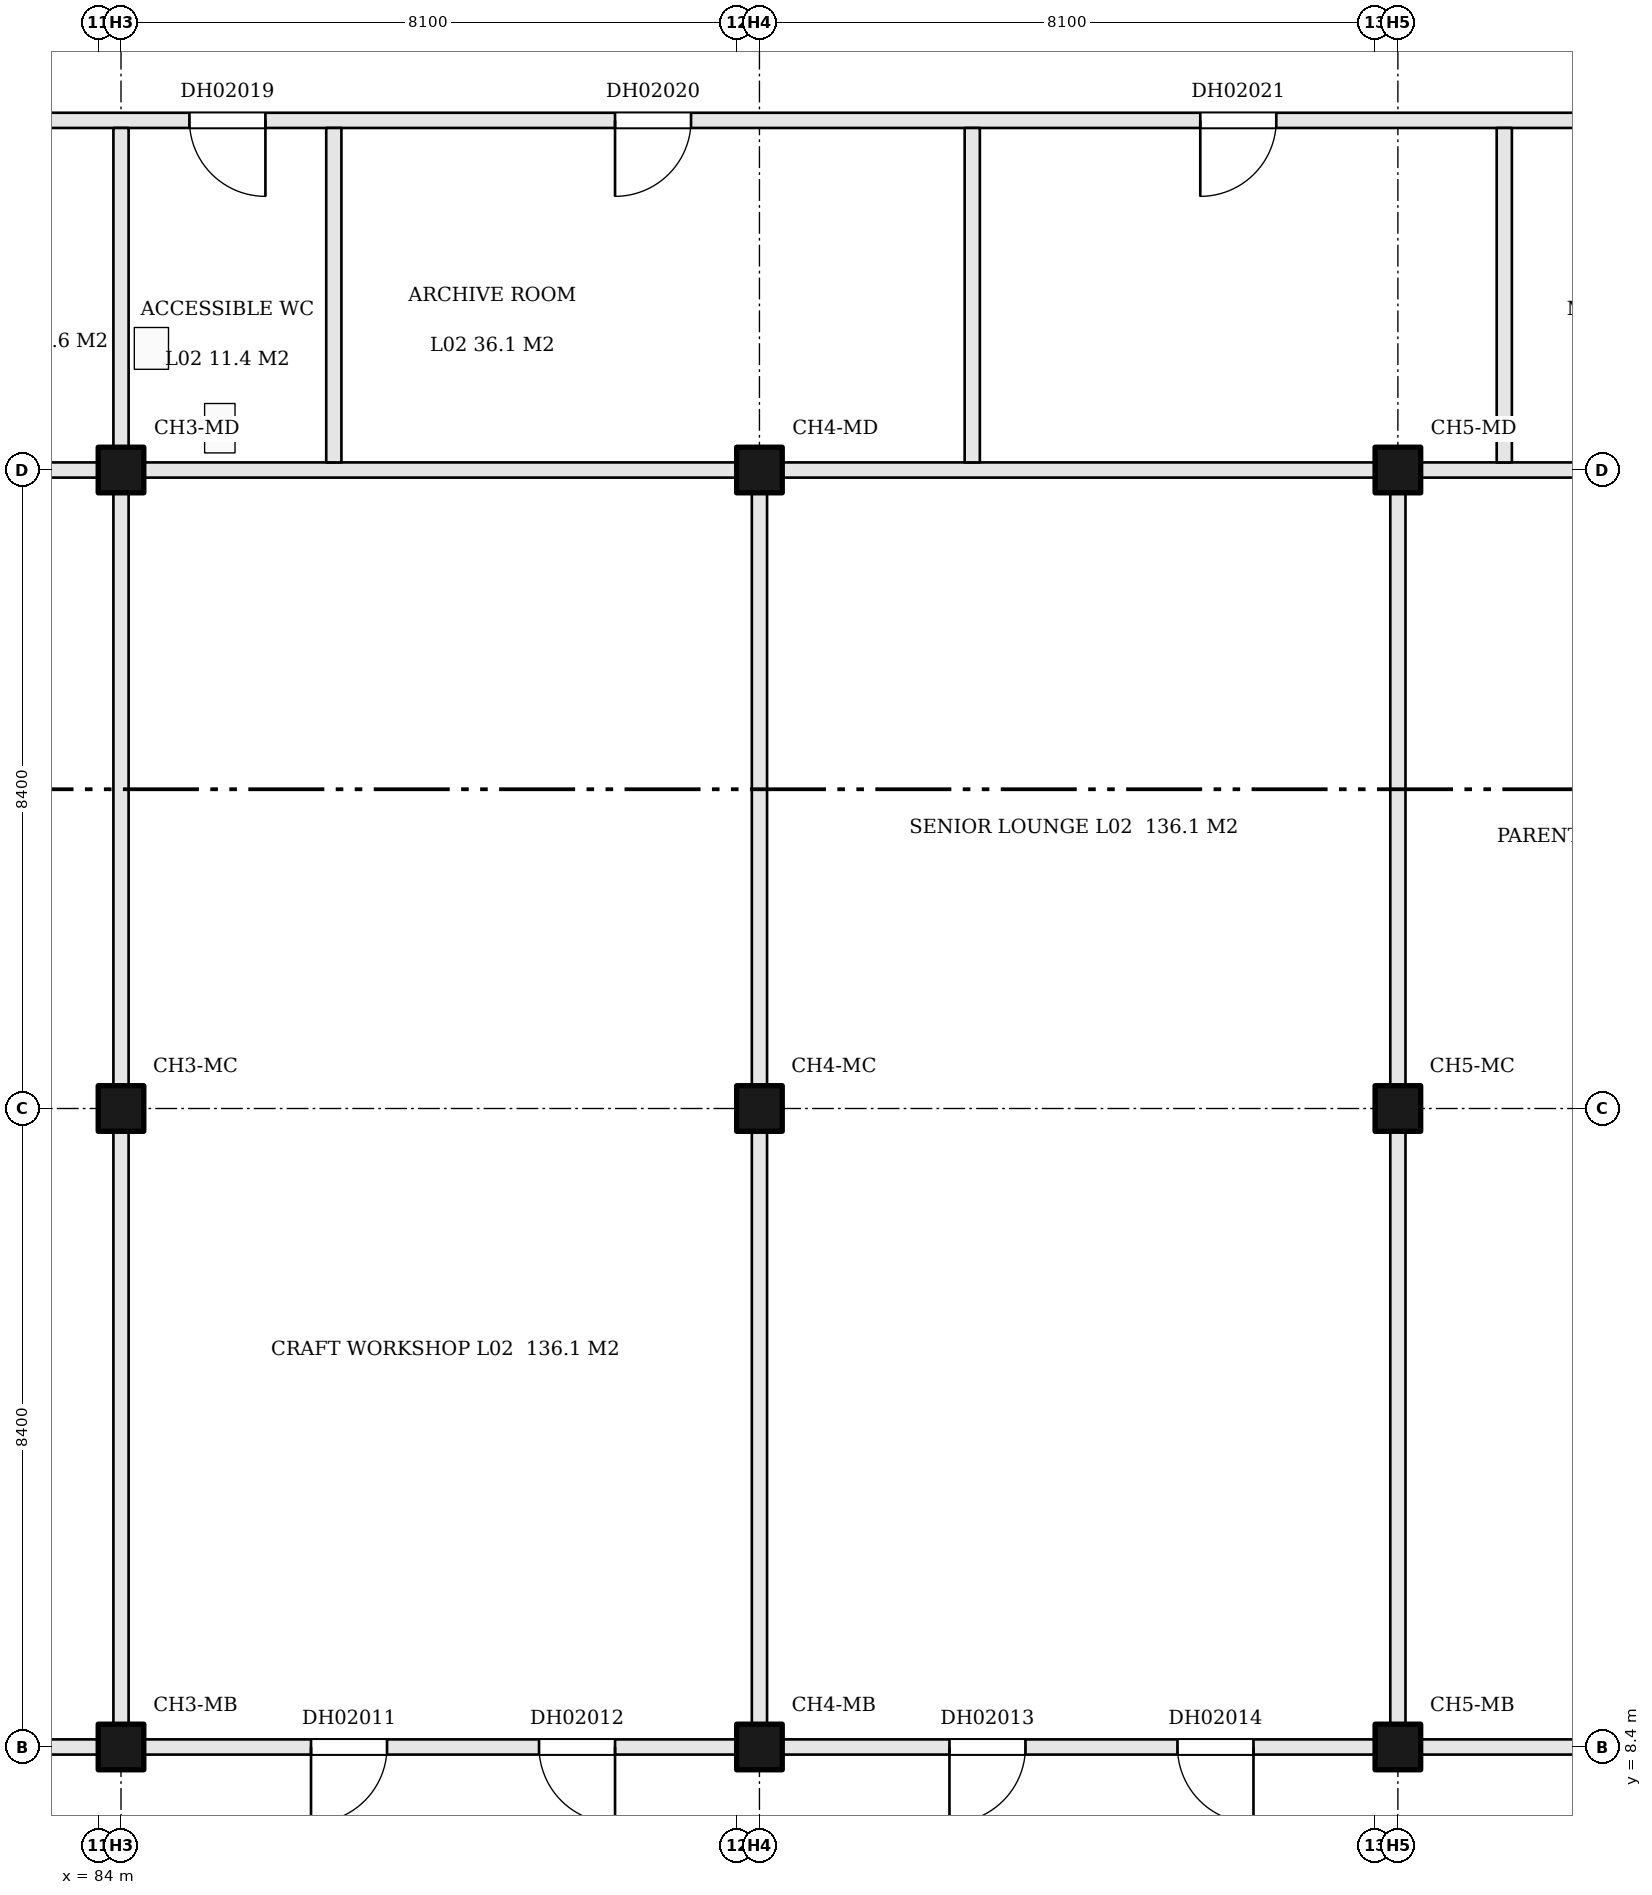
"""IFC4 building model, lengths in metres.
Left out: names, types, materials, properties, quantities, classifications, styles, units other than length and angle.
Written with IfcOpenShell. Run it as: python <this file> out.ifc"""

import sys

from ifc_helpers import new_model, si_unit, direction, frame, frame_2d, origin, origin_2d, place, context, subcontext, project, spatial, rectangle, extrude, element, fill, save


model = new_model("IFC4")
c1 = context("Model", 3, precision=1e-05, world=origin(), true_north=direction((0.0, 1.0)))
c2 = subcontext(c1, "Body", "Model", "MODEL_VIEW")
j1 = project(units=[si_unit("LENGTHUNIT", "METRE"), si_unit("PLANEANGLEUNIT", "RADIAN")], contexts=[c1])
p1 = place(None, origin())
s1 = spatial("IfcSite", under=j1, at=p1, CompositionType="ELEMENT")
p2 = place(p1, origin())
s2 = spatial("IfcBuilding", under=s1, at=p2, CompositionType="ELEMENT")
p3 = place(p2, frame((0.0, 0.0, 14.4)))
s3 = spatial("IfcBuildingStorey", under=s2, at=p3, CompositionType="ELEMENT", Elevation=14.4)
for number, where, z_axis, x_axis in (
    (1, (84.3, 8.4, 0.0), (0.0, 0.0, 1.0), (1.0, 0.0, 0.0)),
    (2, (84.3, 16.8, 0.0), (0.0, 0.0, 1.0), (1.0, 0.0, 0.0)),
    (3, (84.3, 25.2, 0.0), (0.0, 0.0, 1.0), (1.0, 0.0, 0.0)),
    (4, (92.7, 8.4, 0.0), (0.0, 0.0, 1.0), (1.0, 0.0, 0.0)),
    (5, (92.7, 16.8, 0.0), (0.0, 0.0, 1.0), (1.0, 0.0, 0.0)),
    (6, (92.7, 25.2, 0.0), (0.0, 0.0, 1.0), (1.0, 0.0, 0.0)),
    (7, (101.1, 8.4, 0.0), (0.0, 0.0, 1.0), (1.0, 0.0, 0.0)),
    (8, (101.1, 16.8, 0.0), (0.0, 0.0, 1.0), (1.0, 0.0, 0.0)),
    (9, (101.1, 25.2, 0.0), (0.0, 0.0, 1.0), (1.0, 0.0, 0.0)),
):
    element("IfcColumn", number, at=place(p3, frame(where, z_axis=z_axis, x_axis=x_axis)), inside=s3, PredefinedType="COLUMN", context=c2, shape_type="SweptSolid", body=[
        extrude(rectangle(XDim=0.6, YDim=0.6, at=origin_2d()), origin(), (0.0, 0.0, 1.0), 5.1),
    ])
p4 = place(p3, frame((76.2, 8.4, 0.0), z_axis=(0.0, 0.0, 1.0), x_axis=(1.0, 0.0, 0.0)))
e10 = element("IfcWall", 10, at=p4, inside=s3, PredefinedType="PARTITIONING", context=c2, shape_type="SweptSolid", body=[
    extrude(rectangle(XDim=7.8, YDim=0.2, at=frame_2d((3.9, 0.0))), origin(), (0.0, 0.0, 1.0), 5.1),
])
p5 = place(p4, frame((2.2, 0.0, 0.0)))
e11 = element("IfcOpeningElement", 11, at=p5, cuts=e10, PredefinedType="OPENING", context=c2, shape_type="SweptSolid", body=[
    extrude(rectangle(XDim=1.0, YDim=2.1, at=frame_2d((0.5, 1.05))), frame((0.0, 0.11, 0.0), z_axis=(0.0, -1.0, 0.0), x_axis=(1.0, 0.0, 0.0)), (0.0, 0.0, 1.0), 0.22),
])
p6 = place(p4, frame((5.2, 0.0, 0.0)))
e12 = element("IfcOpeningElement", 12, at=p6, cuts=e10, PredefinedType="OPENING", context=c2, shape_type="SweptSolid", body=[
    extrude(rectangle(XDim=1.0, YDim=2.1, at=frame_2d((0.5, 1.05))), frame((0.0, 0.11, 0.0), z_axis=(0.0, -1.0, 0.0), x_axis=(1.0, 0.0, 0.0)), (0.0, 0.0, 1.0), 0.22),
])
p7 = place(p3, frame((84.6, 8.4, 0.0), z_axis=(0.0, 0.0, 1.0), x_axis=(1.0, 0.0, 0.0)))
e13 = element("IfcWall", 13, at=p7, inside=s3, PredefinedType="PARTITIONING", context=c2, shape_type="SweptSolid", body=[
    extrude(rectangle(XDim=7.8, YDim=0.2, at=frame_2d((3.9, 0.0))), origin(), (0.0, 0.0, 1.0), 5.1),
])
p8 = place(p7, frame((2.2, 0.0, 0.0)))
e14 = element("IfcOpeningElement", 14, at=p8, cuts=e13, PredefinedType="OPENING", context=c2, shape_type="SweptSolid", body=[
    extrude(rectangle(XDim=1.0, YDim=2.1, at=frame_2d((0.5, 1.05))), frame((0.0, 0.11, 0.0), z_axis=(0.0, -1.0, 0.0), x_axis=(1.0, 0.0, 0.0)), (0.0, 0.0, 1.0), 0.22),
])
p9 = place(p7, frame((5.2, 0.0, 0.0)))
e15 = element("IfcOpeningElement", 15, at=p9, cuts=e13, PredefinedType="OPENING", context=c2, shape_type="SweptSolid", body=[
    extrude(rectangle(XDim=1.0, YDim=2.1, at=frame_2d((0.5, 1.05))), frame((0.0, 0.11, 0.0), z_axis=(0.0, -1.0, 0.0), x_axis=(1.0, 0.0, 0.0)), (0.0, 0.0, 1.0), 0.22),
])
p10 = place(p3, frame((93.0, 8.4, 0.0), z_axis=(0.0, 0.0, 1.0), x_axis=(1.0, 0.0, 0.0)))
e16 = element("IfcWall", 16, at=p10, inside=s3, PredefinedType="PARTITIONING", context=c2, shape_type="SweptSolid", body=[
    extrude(rectangle(XDim=7.8, YDim=0.2, at=frame_2d((3.9, 0.0))), origin(), (0.0, 0.0, 1.0), 5.1),
])
p11 = place(p10, frame((2.2, 0.0, 0.0)))
e17 = element("IfcOpeningElement", 17, at=p11, cuts=e16, PredefinedType="OPENING", context=c2, shape_type="SweptSolid", body=[
    extrude(rectangle(XDim=1.0, YDim=2.1, at=frame_2d((0.5, 1.05))), frame((0.0, 0.11, 0.0), z_axis=(0.0, -1.0, 0.0), x_axis=(1.0, 0.0, 0.0)), (0.0, 0.0, 1.0), 0.22),
])
p12 = place(p10, frame((5.2, 0.0, 0.0)))
e18 = element("IfcOpeningElement", 18, at=p12, cuts=e16, PredefinedType="OPENING", context=c2, shape_type="SweptSolid", body=[
    extrude(rectangle(XDim=1.0, YDim=2.1, at=frame_2d((0.5, 1.05))), frame((0.0, 0.11, 0.0), z_axis=(0.0, -1.0, 0.0), x_axis=(1.0, 0.0, 0.0)), (0.0, 0.0, 1.0), 0.22),
])
p13 = place(p3, frame((101.4, 8.4, 0.0), z_axis=(0.0, 0.0, 1.0), x_axis=(1.0, 0.0, 0.0)))
e19 = element("IfcWall", 19, at=p13, inside=s3, PredefinedType="PARTITIONING", context=c2, shape_type="SweptSolid", body=[
    extrude(rectangle(XDim=7.8, YDim=0.2, at=frame_2d((3.9, 0.0))), origin(), (0.0, 0.0, 1.0), 5.1),
])
p14 = place(p13, frame((2.2, 0.0, 0.0)))
e20 = element("IfcOpeningElement", 20, at=p14, cuts=e19, PredefinedType="OPENING", context=c2, shape_type="SweptSolid", body=[
    extrude(rectangle(XDim=1.0, YDim=2.1, at=frame_2d((0.5, 1.05))), frame((0.0, 0.11, 0.0), z_axis=(0.0, -1.0, 0.0), x_axis=(1.0, 0.0, 0.0)), (0.0, 0.0, 1.0), 0.22),
])
p15 = place(p13, frame((5.2, 0.0, 0.0)))
e21 = element("IfcOpeningElement", 21, at=p15, cuts=e19, PredefinedType="OPENING", context=c2, shape_type="SweptSolid", body=[
    extrude(rectangle(XDim=1.0, YDim=2.1, at=frame_2d((0.5, 1.05))), frame((0.0, 0.11, 0.0), z_axis=(0.0, -1.0, 0.0), x_axis=(1.0, 0.0, 0.0)), (0.0, 0.0, 1.0), 0.22),
])
p16 = place(p3, frame((76.2, 25.2, 0.0), z_axis=(0.0, 0.0, 1.0), x_axis=(1.0, 0.0, 0.0)))
e22 = element("IfcWall", 22, at=p16, inside=s3, PredefinedType="PARTITIONING", context=c2, shape_type="SweptSolid", body=[
    extrude(rectangle(XDim=7.8, YDim=0.2, at=frame_2d((3.9, 0.0))), origin(), (0.0, 0.0, 1.0), 5.1),
])
p17 = place(p3, frame((84.6, 25.2, 0.0), z_axis=(0.0, 0.0, 1.0), x_axis=(1.0, 0.0, 0.0)))
e23 = element("IfcWall", 23, at=p17, inside=s3, PredefinedType="PARTITIONING", context=c2, shape_type="SweptSolid", body=[
    extrude(rectangle(XDim=7.8, YDim=0.2, at=frame_2d((3.9, 0.0))), origin(), (0.0, 0.0, 1.0), 5.1),
])
for number, where, z_axis, x_axis in (
    (24, (93.0, 25.2, 0.0), (0.0, 0.0, 1.0), (1.0, 0.0, 0.0)),
    (25, (101.4, 25.2, 0.0), (0.0, 0.0, 1.0), (1.0, 0.0, 0.0)),
):
    element("IfcWall", number, at=place(p3, frame(where, z_axis=z_axis, x_axis=x_axis)), inside=s3, PredefinedType="PARTITIONING", context=c2, shape_type="SweptSolid", body=[
        extrude(rectangle(XDim=7.8, YDim=0.2, at=frame_2d((3.9, 0.0))), origin(), (0.0, 0.0, 1.0), 5.1),
    ])
p18 = place(p3, frame((76.025, 29.8, 0.0), z_axis=(0.0, 0.0, 1.0), x_axis=(1.0, 0.0, 0.0)))
e26 = element("IfcWall", 26, at=p18, inside=s3, PredefinedType="PARTITIONING", context=c2, shape_type="SweptSolid", body=[
    extrude(rectangle(XDim=33.375, YDim=0.2, at=frame_2d((16.688, 0.0))), origin(), (0.0, 0.0, 1.0), 5.1),
])
p19 = place(p18, frame((1.538, 0.0, 0.0)))
e27 = element("IfcOpeningElement", 27, at=p19, cuts=e26, PredefinedType="OPENING", context=c2, shape_type="SweptSolid", body=[
    extrude(rectangle(XDim=1.0, YDim=2.1, at=frame_2d((0.5, 1.05))), frame((0.0, 0.11, 0.0), z_axis=(0.0, -1.0, 0.0), x_axis=(1.0, 0.0, 0.0)), (0.0, 0.0, 1.0), 0.22),
])
p20 = place(p18, frame((5.675, 0.0, 0.0)))
e28 = element("IfcOpeningElement", 28, at=p20, cuts=e26, PredefinedType="OPENING", context=c2, shape_type="SweptSolid", body=[
    extrude(rectangle(XDim=1.0, YDim=2.1, at=frame_2d((0.5, 1.05))), frame((0.0, 0.11, 0.0), z_axis=(0.0, -1.0, 0.0), x_axis=(1.0, 0.0, 0.0)), (0.0, 0.0, 1.0), 0.22),
])
p21 = place(p18, frame((9.175, 0.0, 0.0)))
e29 = element("IfcOpeningElement", 29, at=p21, cuts=e26, PredefinedType="OPENING", context=c2, shape_type="SweptSolid", body=[
    extrude(rectangle(XDim=1.0, YDim=2.1, at=frame_2d((0.5, 1.05))), frame((0.0, 0.11, 0.0), z_axis=(0.0, -1.0, 0.0), x_axis=(1.0, 0.0, 0.0)), (0.0, 0.0, 1.0), 0.22),
])
p22 = place(p18, frame((14.775, 0.0, 0.0)))
e30 = element("IfcOpeningElement", 30, at=p22, cuts=e26, PredefinedType="OPENING", context=c2, shape_type="SweptSolid", body=[
    extrude(rectangle(XDim=1.0, YDim=2.1, at=frame_2d((0.5, 1.05))), frame((0.0, 0.11, 0.0), z_axis=(0.0, -1.0, 0.0), x_axis=(1.0, 0.0, 0.0)), (0.0, 0.0, 1.0), 0.22),
])
p23 = place(p18, frame((22.475, 0.0, 0.0)))
e31 = element("IfcOpeningElement", 31, at=p23, cuts=e26, PredefinedType="OPENING", context=c2, shape_type="SweptSolid", body=[
    extrude(rectangle(XDim=1.0, YDim=2.1, at=frame_2d((0.5, 1.05))), frame((0.0, 0.11, 0.0), z_axis=(0.0, -1.0, 0.0), x_axis=(1.0, 0.0, 0.0)), (0.0, 0.0, 1.0), 0.22),
])
p24 = place(p18, frame((29.475, 0.0, 0.0)))
e32 = element("IfcOpeningElement", 32, at=p24, cuts=e26, PredefinedType="OPENING", context=c2, shape_type="SweptSolid", body=[
    extrude(rectangle(XDim=1.0, YDim=2.1, at=frame_2d((0.5, 1.05))), frame((0.0, 0.11, 0.0), z_axis=(0.0, -1.0, 0.0), x_axis=(1.0, 0.0, 0.0)), (0.0, 0.0, 1.0), 0.22),
])
p25 = place(p3, frame((84.3, 8.7, 0.0), z_axis=(0.0, 0.0, 1.0), x_axis=(0.0, 1.0, 0.0)))
e33 = element("IfcWall", 33, at=p25, inside=s3, PredefinedType="PARTITIONING", context=c2, shape_type="SweptSolid", body=[
    extrude(rectangle(XDim=7.8, YDim=0.2, at=frame_2d((3.9, 0.0))), origin(), (0.0, 0.0, 1.0), 5.1),
])
p26 = place(p3, frame((84.3, 17.1, 0.0), z_axis=(0.0, 0.0, 1.0), x_axis=(0.0, 1.0, 0.0)))
e34 = element("IfcWall", 34, at=p26, inside=s3, PredefinedType="PARTITIONING", context=c2, shape_type="SweptSolid", body=[
    extrude(rectangle(XDim=7.8, YDim=0.2, at=frame_2d((3.9, 0.0))), origin(), (0.0, 0.0, 1.0), 5.1),
])
p27 = place(p3, frame((84.3, 25.5, 0.0), z_axis=(0.0, 0.0, 1.0), x_axis=(0.0, 1.0, 0.0)))
e35 = element("IfcWall", 35, at=p27, inside=s3, PredefinedType="PARTITIONING", context=c2, shape_type="SweptSolid", body=[
    extrude(rectangle(XDim=4.2, YDim=0.2, at=frame_2d((2.1, 0.0))), origin(), (0.0, 0.0, 1.0), 5.1),
])
p28 = place(p3, frame((87.1, 25.3, 0.0), z_axis=(0.0, 0.0, 1.0), x_axis=(0.0, 1.0, 0.0)))
e36 = element("IfcWall", 36, at=p28, inside=s3, PredefinedType="PARTITIONING", context=c2, shape_type="SweptSolid", body=[
    extrude(rectangle(XDim=4.4, YDim=0.2, at=frame_2d((2.2, 0.0))), origin(), (0.0, 0.0, 1.0), 5.1),
])
p29 = place(p3, frame((92.7, 8.7, 0.0), z_axis=(0.0, 0.0, 1.0), x_axis=(0.0, 1.0, 0.0)))
e37 = element("IfcWall", 37, at=p29, inside=s3, PredefinedType="PARTITIONING", context=c2, shape_type="SweptSolid", body=[
    extrude(rectangle(XDim=7.8, YDim=0.2, at=frame_2d((3.9, 0.0))), origin(), (0.0, 0.0, 1.0), 5.1),
])
p30 = place(p3, frame((92.7, 17.1, 0.0), z_axis=(0.0, 0.0, 1.0), x_axis=(0.0, 1.0, 0.0)))
e38 = element("IfcWall", 38, at=p30, inside=s3, PredefinedType="PARTITIONING", context=c2, shape_type="SweptSolid", body=[
    extrude(rectangle(XDim=7.8, YDim=0.2, at=frame_2d((3.9, 0.0))), origin(), (0.0, 0.0, 1.0), 5.1),
])
p31 = place(p3, frame((95.5, 25.3, 0.0), z_axis=(0.0, 0.0, 1.0), x_axis=(0.0, 1.0, 0.0)))
e39 = element("IfcWall", 39, at=p31, inside=s3, PredefinedType="PARTITIONING", context=c2, shape_type="SweptSolid", body=[
    extrude(rectangle(XDim=4.4, YDim=0.2, at=frame_2d((2.2, 0.0))), origin(), (0.0, 0.0, 1.0), 5.1),
])
p32 = place(p3, frame((101.1, 8.7, 0.0), z_axis=(0.0, 0.0, 1.0), x_axis=(0.0, 1.0, 0.0)))
e40 = element("IfcWall", 40, at=p32, inside=s3, PredefinedType="PARTITIONING", context=c2, shape_type="SweptSolid", body=[
    extrude(rectangle(XDim=7.8, YDim=0.2, at=frame_2d((3.9, 0.0))), origin(), (0.0, 0.0, 1.0), 5.1),
])
p33 = place(p3, frame((101.1, 17.1, 0.0), z_axis=(0.0, 0.0, 1.0), x_axis=(0.0, 1.0, 0.0)))
e41 = element("IfcWall", 41, at=p33, inside=s3, PredefinedType="PARTITIONING", context=c2, shape_type="SweptSolid", body=[
    extrude(rectangle(XDim=7.8, YDim=0.2, at=frame_2d((3.9, 0.0))), origin(), (0.0, 0.0, 1.0), 5.1),
])
p34 = place(p3, frame((102.5, 25.3, 0.0), z_axis=(0.0, 0.0, 1.0), x_axis=(0.0, 1.0, 0.0)))
e42 = element("IfcWall", 42, at=p34, inside=s3, PredefinedType="PARTITIONING", context=c2, shape_type="SweptSolid", body=[
    extrude(rectangle(XDim=4.4, YDim=0.2, at=frame_2d((2.2, 0.0))), origin(), (0.0, 0.0, 1.0), 5.1),
])
p35 = place(p8, frame((1.0, 0.0, 0.0), z_axis=(0.0, 0.0, 1.0), x_axis=(-1.0, 0.0, 0.0)))
e43 = element("IfcDoor", 43, at=p35, inside=s3, OperationType="SINGLE_SWING_RIGHT", PredefinedType="DOOR", context=c2, shape_type="SweptSolid", body=[
    extrude(rectangle(XDim=1.0, YDim=2.1, at=frame_2d((0.5, 1.05))), frame((0.0, 0.025, 0.0), z_axis=(0.0, -1.0, 0.0), x_axis=(1.0, 0.0, 0.0)), (0.0, 0.0, 1.0), 0.05),
])
fill(e14, e43)
p36 = place(p9, frame((1.0, 0.0, 0.0), z_axis=(0.0, 0.0, 1.0), x_axis=(-1.0, 0.0, 0.0)))
e44 = element("IfcDoor", 44, at=p36, inside=s3, OperationType="SINGLE_SWING_LEFT", PredefinedType="DOOR", context=c2, shape_type="SweptSolid", body=[
    extrude(rectangle(XDim=1.0, YDim=2.1, at=frame_2d((0.5, 1.05))), frame((0.0, 0.025, 0.0), z_axis=(0.0, -1.0, 0.0), x_axis=(1.0, 0.0, 0.0)), (0.0, 0.0, 1.0), 0.05),
])
fill(e15, e44)
p37 = place(p11, frame((1.0, 0.0, 0.0), z_axis=(0.0, 0.0, 1.0), x_axis=(-1.0, 0.0, 0.0)))
e45 = element("IfcDoor", 45, at=p37, inside=s3, OperationType="SINGLE_SWING_RIGHT", PredefinedType="DOOR", context=c2, shape_type="SweptSolid", body=[
    extrude(rectangle(XDim=1.0, YDim=2.1, at=frame_2d((0.5, 1.05))), frame((0.0, 0.025, 0.0), z_axis=(0.0, -1.0, 0.0), x_axis=(1.0, 0.0, 0.0)), (0.0, 0.0, 1.0), 0.05),
])
fill(e17, e45)
p38 = place(p12, frame((1.0, 0.0, 0.0), z_axis=(0.0, 0.0, 1.0), x_axis=(-1.0, 0.0, 0.0)))
e46 = element("IfcDoor", 46, at=p38, inside=s3, OperationType="SINGLE_SWING_LEFT", PredefinedType="DOOR", context=c2, shape_type="SweptSolid", body=[
    extrude(rectangle(XDim=1.0, YDim=2.1, at=frame_2d((0.5, 1.05))), frame((0.0, 0.025, 0.0), z_axis=(0.0, -1.0, 0.0), x_axis=(1.0, 0.0, 0.0)), (0.0, 0.0, 1.0), 0.05),
])
fill(e18, e46)
p39 = place(p21, frame((1.0, 0.0, 0.0), z_axis=(0.0, 0.0, 1.0), x_axis=(-1.0, 0.0, 0.0)))
e47 = element("IfcDoor", 47, at=p39, inside=s3, OperationType="SINGLE_SWING_LEFT", PredefinedType="DOOR", context=c2, shape_type="SweptSolid", body=[
    extrude(rectangle(XDim=1.0, YDim=2.1, at=frame_2d((0.5, 1.05))), frame((0.0, 0.025, 0.0), z_axis=(0.0, -1.0, 0.0), x_axis=(1.0, 0.0, 0.0)), (0.0, 0.0, 1.0), 0.05),
])
fill(e29, e47)
p40 = place(p22, frame((1.0, 0.0, 0.0), z_axis=(0.0, 0.0, 1.0), x_axis=(-1.0, 0.0, 0.0)))
e48 = element("IfcDoor", 48, at=p40, inside=s3, OperationType="SINGLE_SWING_RIGHT", PredefinedType="DOOR", context=c2, shape_type="SweptSolid", body=[
    extrude(rectangle(XDim=1.0, YDim=2.1, at=frame_2d((0.5, 1.05))), frame((0.0, 0.025, 0.0), z_axis=(0.0, -1.0, 0.0), x_axis=(1.0, 0.0, 0.0)), (0.0, 0.0, 1.0), 0.05),
])
fill(e30, e48)
p41 = place(p23, frame((1.0, 0.0, 0.0), z_axis=(0.0, 0.0, 1.0), x_axis=(-1.0, 0.0, 0.0)))
e49 = element("IfcDoor", 49, at=p41, inside=s3, OperationType="SINGLE_SWING_RIGHT", PredefinedType="DOOR", context=c2, shape_type="SweptSolid", body=[
    extrude(rectangle(XDim=1.0, YDim=2.1, at=frame_2d((0.5, 1.05))), frame((0.0, 0.025, 0.0), z_axis=(0.0, -1.0, 0.0), x_axis=(1.0, 0.0, 0.0)), (0.0, 0.0, 1.0), 0.05),
])
fill(e31, e49)
save(model, sys.argv[1])
